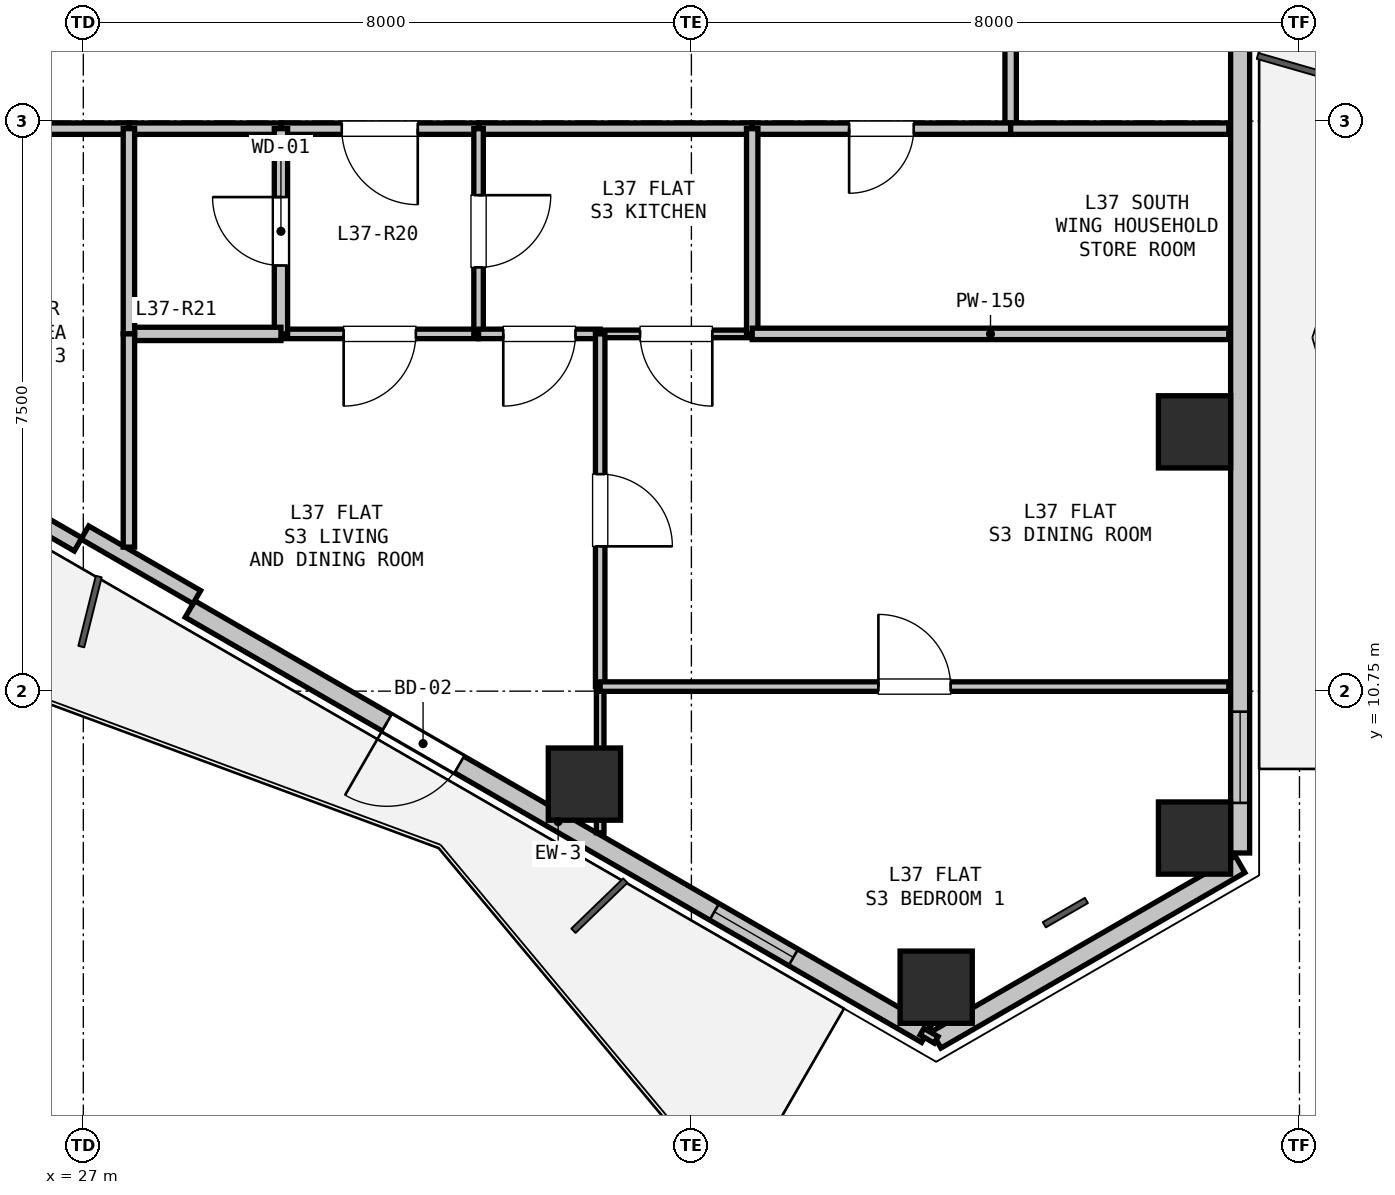
"""IFC4 building model, lengths in metres.
Left out: names, types, materials, properties, quantities, classifications, styles, units other than length and angle.
Written with IfcOpenShell. Run it as: python <this file> out.ifc"""

import sys

from ifc_helpers import new_model, si_unit, direction, frame, frame_2d, origin, origin_2d, place, context, subcontext, project, spatial, rectangle, hollow_rectangle, extrude, element, fill, save


model = new_model("IFC4")
c1 = context("Model", 3, precision=1e-05, world=origin(), true_north=direction((0.0, 1.0)))
c2 = subcontext(c1, "Body", "Model", "MODEL_VIEW")
j1 = project(units=[si_unit("LENGTHUNIT", "METRE"), si_unit("PLANEANGLEUNIT", "RADIAN")], contexts=[c1])
p1 = place(None, origin())
s1 = spatial("IfcSite", under=j1, at=p1, CompositionType="ELEMENT")
p2 = place(p1, origin())
s2 = spatial("IfcBuilding", under=s1, at=p2, CompositionType="ELEMENT")
p3 = place(p2, frame((0.0, 0.0, 134.4)))
s3 = spatial("IfcBuildingStorey", under=s2, at=p3, CompositionType="ELEMENT", Elevation=134.4)
for number, where, z_axis, x_axis in (
    (1, (41.619, 14.161, 0.0), (0.0, 0.0, 1.0), (1.0, 0.0, 0.0)),
    (2, (41.619, 8.817, 0.0), (0.0, 0.0, 1.0), (1.0, 0.0, 0.0)),
    (3, (38.22, 6.855, 0.0), (0.0, 0.0, 1.0), (1.0, 0.0, 0.0)),
    (4, (33.593, 9.527, 0.0), (0.0, 0.0, 1.0), (1.0, 0.0, 0.0)),
):
    element("IfcColumn", number, at=place(p3, frame(where, z_axis=z_axis, x_axis=x_axis)), inside=s3, PredefinedType="COLUMN", context=c2, shape_type="SweptSolid", body=[
        extrude(hollow_rectangle(XDim=0.95, YDim=0.95, WallThickness=0.028, at=origin_2d()), origin(), (0.0, 0.0, 1.0), 3.3),
    ])
p4 = place(p3, frame((42.219, 8.471, 0.0), z_axis=(0.0, 0.0, 1.0), x_axis=(-0.866035021055, -0.499983342029, 0.0)))
e5 = element("IfcWall", 5, at=p4, inside=s3, PredefinedType="SOLIDWALL", context=c2, shape_type="SweptSolid", body=[
    extrude(rectangle(XDim=4.617, YDim=0.25, at=frame_2d((2.309, 0.0))), origin(), (0.0, 0.0, 1.0), 2.68),
])
p5 = place(p3, frame((42.219, 19.807, 0.0), z_axis=(0.0, 0.0, 1.0), x_axis=(0.0, -1.0, 0.0)))
e6 = element("IfcWall", 6, at=p5, inside=s3, PredefinedType="SOLIDWALL", context=c2, shape_type="SweptSolid", body=[
    extrude(rectangle(XDim=11.186, YDim=0.25, at=frame_2d((5.593, 0.0))), origin(), (0.0, 0.0, 1.0), 2.68),
])
p6 = place(p5, frame((9.327, 0.0, 0.9)))
e7 = element("IfcOpeningElement", 7, at=p6, cuts=e6, PredefinedType="OPENING", context=c2, shape_type="SweptSolid", body=[
    extrude(rectangle(XDim=1.2, YDim=1.4, at=frame_2d((0.6, 0.7))), frame((0.0, 0.135, 0.0), z_axis=(0.0, -1.0, 0.0), x_axis=(1.0, 0.0, 0.0)), (0.0, 0.0, 1.0), 0.27),
])
p7 = place(p3, frame((38.091, 6.237, 0.0), z_axis=(0.0, 0.0, 1.0), x_axis=(-0.86602239209, 0.500005216371, 0.0)))
e8 = element("IfcWall", 8, at=p7, inside=s3, PredefinedType="SOLIDWALL", context=c2, shape_type="SweptSolid", body=[
    extrude(rectangle(XDim=11.186, YDim=0.25, at=frame_2d((5.593, 0.0))), origin(), (0.0, 0.0, 1.0), 2.68),
])
p8 = place(p7, frame((7.095, 0.0, 0.0)))
e9 = element("IfcOpeningElement", 9, at=p8, cuts=e8, PredefinedType="OPENING", context=c2, shape_type="SweptSolid", body=[
    extrude(rectangle(XDim=1.1, YDim=2.1, at=frame_2d((0.55, 1.05))), frame((0.0, 0.135, 0.0), z_axis=(0.0, -1.0, 0.0), x_axis=(1.0, 0.0, 0.0)), (0.0, 0.0, 1.0), 0.27),
])
p9 = place(p7, frame((2.02, 0.0, 0.9)))
e10 = element("IfcOpeningElement", 10, at=p9, cuts=e8, PredefinedType="OPENING", context=c2, shape_type="SweptSolid", body=[
    extrude(rectangle(XDim=1.2, YDim=1.4, at=frame_2d((0.6, 0.7))), frame((0.0, 0.135, 0.0), z_axis=(0.0, -1.0, 0.0), x_axis=(1.0, 0.0, 0.0)), (0.0, 0.0, 1.0), 0.27),
])
p10 = place(p3, frame((26.931, 12.68, 0.0), z_axis=(0.0, 0.0, 1.0), x_axis=(-0.866026619769, 0.499997893847, 0.0)))
e11 = element("IfcWall", 11, at=p10, inside=s3, PredefinedType="PARAPET", context=c2, shape_type="SweptSolid", body=[
    extrude(rectangle(XDim=10.486, YDim=0.2, at=frame_2d((5.243, 0.0))), origin(), (0.0, 0.0, 1.0), 0.2),
])
p11 = place(p3, frame((28.493, 11.986, 0.0), z_axis=(0.0, 0.0, 1.0), x_axis=(-0.86605165483, 0.499954529098, 0.0)))
e12 = element("IfcWall", 12, at=p11, inside=s3, PredefinedType="PARAPET", context=c2, shape_type="SweptSolid", body=[
    extrude(rectangle(XDim=1.7, YDim=0.2, at=frame_2d((0.85, 0.0))), origin(), (0.0, 0.0, 1.0), 2.68),
])
p12 = place(p3, frame((39.2, 19.9, 0.0), z_axis=(0.0, 0.0, 1.0), x_axis=(0.0, -1.0, 0.0)))
e13 = element("IfcWall", 13, at=p12, inside=s3, PredefinedType="PARTITIONING", context=c2, shape_type="SweptSolid", body=[
    extrude(rectangle(XDim=1.75, YDim=0.15, at=frame_2d((0.875, 0.0))), origin(), (0.0, 0.0, 1.0), 3.06),
])
p13 = place(p3, frame((39.2, 18.15, 0.0), z_axis=(0.0, 0.0, 1.0), x_axis=(-1.0, 0.0, 0.0)))
e14 = element("IfcWall", 14, at=p13, inside=s3, PredefinedType="PARTITIONING", context=c2, shape_type="SweptSolid", body=[
    extrude(rectangle(XDim=3.4, YDim=0.15, at=frame_2d((1.7, 0.0))), origin(), (0.0, 0.0, 1.0), 2.433),
])
p14 = place(p13, frame((1.275, 0.0, 0.0)))
e15 = element("IfcOpeningElement", 15, at=p14, cuts=e14, PredefinedType="OPENING", context=c2, shape_type="SweptSolid", body=[
    extrude(rectangle(XDim=0.85, YDim=2.1, at=frame_2d((0.425, 1.05))), frame((0.0, 0.085, 0.0), z_axis=(0.0, -1.0, 0.0), x_axis=(1.0, 0.0, 0.0)), (0.0, 0.0, 1.0), 0.17),
])
p15 = place(p3, frame((35.8, 18.15, 0.0), z_axis=(0.0, 0.0, 1.0), x_axis=(-1.0, 0.0, 0.0)))
e16 = element("IfcWall", 16, at=p15, inside=s3, PredefinedType="PARTITIONING", context=c2, shape_type="SweptSolid", body=[
    extrude(rectangle(XDim=3.6, YDim=0.15, at=frame_2d((1.8, 0.0))), origin(), (0.0, 0.0, 1.0), 3.06),
])
p16 = place(p3, frame((32.2, 18.15, 0.0), z_axis=(0.0, 0.0, 1.0), x_axis=(-1.0, 0.0, 0.0)))
e17 = element("IfcWall", 17, at=p16, inside=s3, PredefinedType="PARTITIONING", context=c2, shape_type="SweptSolid", body=[
    extrude(rectangle(XDim=2.6, YDim=0.15, at=frame_2d((1.3, 0.0))), origin(), (0.0, 0.0, 1.0), 3.06),
])
p17 = place(p16, frame((0.8, 0.0, 0.0)))
e18 = element("IfcOpeningElement", 18, at=p17, cuts=e17, PredefinedType="OPENING", context=c2, shape_type="SweptSolid", body=[
    extrude(rectangle(XDim=1.0, YDim=2.15, at=frame_2d((0.5, 1.075))), frame((0.0, 0.085, 0.0), z_axis=(0.0, -1.0, 0.0), x_axis=(1.0, 0.0, 0.0)), (0.0, 0.0, 1.0), 0.17),
])
p18 = place(p3, frame((29.6, 18.15, 0.0), z_axis=(0.0, 0.0, 1.0), x_axis=(-1.0, 0.0, 0.0)))
e19 = element("IfcWall", 19, at=p18, inside=s3, PredefinedType="PARTITIONING", context=c2, shape_type="SweptSolid", body=[
    extrude(rectangle(XDim=2.0, YDim=0.15, at=frame_2d((1.0, 0.0))), origin(), (0.0, 0.0, 1.0), 3.06),
])
p19 = place(p3, frame((27.6, 18.15, 0.0), z_axis=(0.0, 0.0, 1.0), x_axis=(-1.0, 0.0, 0.0)))
e20 = element("IfcWall", 20, at=p19, inside=s3, PredefinedType="PARTITIONING", context=c2, shape_type="SweptSolid", body=[
    extrude(rectangle(XDim=3.2, YDim=0.15, at=frame_2d((1.6, 0.0))), origin(), (0.0, 0.0, 1.0), 2.433),
])
p20 = place(p19, frame((1.1, 0.0, 0.0)))
e21 = element("IfcOpeningElement", 21, at=p20, cuts=e20, PredefinedType="OPENING", context=c2, shape_type="SweptSolid", body=[
    extrude(rectangle(XDim=1.0, YDim=2.15, at=frame_2d((0.5, 1.075))), frame((0.0, 0.085, 0.0), z_axis=(0.0, -1.0, 0.0), x_axis=(1.0, 0.0, 0.0)), (0.0, 0.0, 1.0), 0.17),
])
p21 = place(p3, frame((32.2, 15.45, 0.0), z_axis=(0.0, 0.0, 1.0), x_axis=(-1.0, 0.0, 0.0)))
e22 = element("IfcWall", 22, at=p21, inside=s3, PredefinedType="PARTITIONING", context=c2, shape_type="SweptSolid", body=[
    extrude(rectangle(XDim=2.6, YDim=0.125, at=frame_2d((1.3, 0.0))), origin(), (0.0, 0.0, 1.0), 3.06),
])
p22 = place(p21, frame((0.825, 0.0, 0.0)))
e23 = element("IfcOpeningElement", 23, at=p22, cuts=e22, PredefinedType="OPENING", context=c2, shape_type="SweptSolid", body=[
    extrude(rectangle(XDim=0.95, YDim=2.1, at=frame_2d((0.475, 1.05))), frame((0.0, 0.073, 0.0), z_axis=(0.0, -1.0, 0.0), x_axis=(1.0, 0.0, 0.0)), (0.0, 0.0, 1.0), 0.145),
])
p23 = place(p3, frame((29.6, 15.45, 0.0), z_axis=(0.0, 0.0, 1.0), x_axis=(0.0, 1.0, 0.0)))
e24 = element("IfcWall", 24, at=p23, inside=s3, PredefinedType="PLUMBINGWALL", context=c2, shape_type="SweptSolid", body=[
    extrude(rectangle(XDim=2.7, YDim=0.175, at=frame_2d((1.35, 0.0))), origin(), (0.0, 0.0, 1.0), 3.06),
])
p24 = place(p23, frame((0.9, 0.0, 0.0)))
e25 = element("IfcOpeningElement", 25, at=p24, cuts=e24, PredefinedType="OPENING", context=c2, shape_type="SweptSolid", body=[
    extrude(rectangle(XDim=0.9, YDim=2.1, at=frame_2d((0.45, 1.05))), frame((0.0, 0.097, 0.0), z_axis=(0.0, -1.0, 0.0), x_axis=(1.0, 0.0, 0.0)), (0.0, 0.0, 1.0), 0.195),
])
p25 = place(p3, frame((32.2, 18.15, 0.0), z_axis=(0.0, 0.0, 1.0), x_axis=(0.0, -1.0, 0.0)))
e26 = element("IfcWall", 26, at=p25, inside=s3, PredefinedType="PARTITIONING", context=c2, shape_type="SweptSolid", body=[
    extrude(rectangle(XDim=2.7, YDim=0.125, at=frame_2d((1.35, 0.0))), origin(), (0.0, 0.0, 1.0), 3.06),
])
p26 = place(p25, frame((0.875, 0.0, 0.0)))
e27 = element("IfcOpeningElement", 27, at=p26, cuts=e26, PredefinedType="OPENING", context=c2, shape_type="SweptSolid", body=[
    extrude(rectangle(XDim=0.95, YDim=2.1, at=frame_2d((0.475, 1.05))), frame((0.0, 0.073, 0.0), z_axis=(0.0, -1.0, 0.0), x_axis=(1.0, 0.0, 0.0)), (0.0, 0.0, 1.0), 0.145),
])
p27 = place(p3, frame((29.6, 15.45, 0.0), z_axis=(0.0, 0.0, 1.0), x_axis=(-1.0, 0.0, 0.0)))
e28 = element("IfcWall", 28, at=p27, inside=s3, PredefinedType="PLUMBINGWALL", context=c2, shape_type="SweptSolid", body=[
    extrude(rectangle(XDim=2.0, YDim=0.175, at=frame_2d((1.0, 0.0))), origin(), (0.0, 0.0, 1.0), 3.06),
])
p28 = place(p3, frame((27.6, 15.45, 0.0), z_axis=(0.0, 0.0, 1.0), x_axis=(0.0, 1.0, 0.0)))
e29 = element("IfcWall", 29, at=p28, inside=s3, PredefinedType="PARTITIONING", context=c2, shape_type="SweptSolid", body=[
    extrude(rectangle(XDim=2.7, YDim=0.15, at=frame_2d((1.35, 0.0))), origin(), (0.0, 0.0, 1.0), 3.06),
])
p29 = place(p3, frame((35.8, 15.45, 0.0), z_axis=(0.0, 0.0, 1.0), x_axis=(-1.0, 0.0, 0.0)))
e30 = element("IfcWall", 30, at=p29, inside=s3, PredefinedType="PARTITIONING", context=c2, shape_type="SweptSolid", body=[
    extrude(rectangle(XDim=2.0, YDim=0.1, at=frame_2d((1.0, 0.0))), origin(), (0.0, 0.0, 1.0), 3.06),
])
p30 = place(p29, frame((0.525, 0.0, 0.0)))
e31 = element("IfcOpeningElement", 31, at=p30, cuts=e30, PredefinedType="OPENING", context=c2, shape_type="SweptSolid", body=[
    extrude(rectangle(XDim=0.95, YDim=2.1, at=frame_2d((0.475, 1.05))), frame((0.0, 0.06, 0.0), z_axis=(0.0, -1.0, 0.0), x_axis=(1.0, 0.0, 0.0)), (0.0, 0.0, 1.0), 0.12),
])
p31 = place(p3, frame((33.8, 15.45, 0.0), z_axis=(0.0, 0.0, 1.0), x_axis=(-1.0, 0.0, 0.0)))
e32 = element("IfcWall", 32, at=p31, inside=s3, PredefinedType="PARTITIONING", context=c2, shape_type="SweptSolid", body=[
    extrude(rectangle(XDim=1.6, YDim=0.125, at=frame_2d((0.8, 0.0))), origin(), (0.0, 0.0, 1.0), 3.06),
])
p32 = place(p31, frame((0.325, 0.0, 0.0)))
e33 = element("IfcOpeningElement", 33, at=p32, cuts=e32, PredefinedType="OPENING", context=c2, shape_type="SweptSolid", body=[
    extrude(rectangle(XDim=0.95, YDim=2.1, at=frame_2d((0.475, 1.05))), frame((0.0, 0.073, 0.0), z_axis=(0.0, -1.0, 0.0), x_axis=(1.0, 0.0, 0.0)), (0.0, 0.0, 1.0), 0.145),
])
p33 = place(p3, frame((35.8, 18.15, 0.0), z_axis=(0.0, 0.0, 1.0), x_axis=(0.0, -1.0, 0.0)))
e34 = element("IfcWall", 34, at=p33, inside=s3, PredefinedType="PARTITIONING", context=c2, shape_type="SweptSolid", body=[
    extrude(rectangle(XDim=2.7, YDim=0.15, at=frame_2d((1.35, 0.0))), origin(), (0.0, 0.0, 1.0), 3.06),
])
p34 = place(p3, frame((39.2, 18.15, 0.0), z_axis=(0.0, 0.0, 1.0), x_axis=(1.0, 0.0, 0.0)))
e35 = element("IfcWall", 35, at=p34, inside=s3, PredefinedType="PARTITIONING", context=c2, shape_type="SweptSolid", body=[
    extrude(rectangle(XDim=2.87, YDim=0.15, at=frame_2d((1.435, 0.0))), origin(), (0.0, 0.0, 1.0), 2.365),
])
p35 = place(p3, frame((42.07, 15.45, 0.0), z_axis=(0.0, 0.0, 1.0), x_axis=(-1.0, 0.0, 0.0)))
e36 = element("IfcWall", 36, at=p35, inside=s3, PredefinedType="PARTITIONING", context=c2, shape_type="SweptSolid", body=[
    extrude(rectangle(XDim=6.27, YDim=0.15, at=frame_2d((3.135, 0.0))), origin(), (0.0, 0.0, 1.0), 2.365),
])
p36 = place(p3, frame((27.6, 15.45, 0.0), z_axis=(0.0, 0.0, 1.0), x_axis=(0.0, -1.0, 0.0)))
e37 = element("IfcWall", 37, at=p36, inside=s3, PredefinedType="PARTITIONING", context=c2, shape_type="SweptSolid", body=[
    extrude(rectangle(XDim=2.805, YDim=0.15, at=frame_2d((1.402, 0.0))), origin(), (0.0, 0.0, 1.0), 2.365),
])
p37 = place(p3, frame((33.8, 15.45, 0.0), z_axis=(0.0, 0.0, 1.0), x_axis=(0.0, -1.0, 0.0)))
e38 = element("IfcWall", 38, at=p37, inside=s3, PredefinedType="PARTITIONING", context=c2, shape_type="SweptSolid", body=[
    extrude(rectangle(XDim=4.64, YDim=0.125, at=frame_2d((2.32, 0.0))), origin(), (0.0, 0.0, 1.0), 3.06),
])
p38 = place(p37, frame((1.845, 0.0, 0.0)))
e39 = element("IfcOpeningElement", 39, at=p38, cuts=e38, PredefinedType="OPENING", context=c2, shape_type="SweptSolid", body=[
    extrude(rectangle(XDim=0.95, YDim=2.1, at=frame_2d((0.475, 1.05))), frame((0.0, 0.073, 0.0), z_axis=(0.0, -1.0, 0.0), x_axis=(1.0, 0.0, 0.0)), (0.0, 0.0, 1.0), 0.145),
])
p39 = place(p3, frame((33.8, 10.81, 0.0), z_axis=(0.0, 0.0, 1.0), x_axis=(0.0, -1.0, 0.0)))
e40 = element("IfcWall", 40, at=p39, inside=s3, PredefinedType="PARTITIONING", context=c2, shape_type="SweptSolid", body=[
    extrude(rectangle(XDim=1.923, YDim=0.1, at=frame_2d((0.962, 0.0))), origin(), (0.0, 0.0, 1.0), 3.06),
])
p40 = place(p3, frame((33.8, 10.81, 0.0), z_axis=(0.0, 0.0, 1.0), x_axis=(1.0, 0.0, 0.0)))
e41 = element("IfcWall", 41, at=p40, inside=s3, PredefinedType="PARTITIONING", context=c2, shape_type="SweptSolid", body=[
    extrude(rectangle(XDim=8.27, YDim=0.125, at=frame_2d((4.135, 0.0))), origin(), (0.0, 0.0, 1.0), 2.433),
])
p41 = place(p40, frame((3.66, 0.0, 0.0)))
e42 = element("IfcOpeningElement", 42, at=p41, cuts=e41, PredefinedType="OPENING", context=c2, shape_type="SweptSolid", body=[
    extrude(rectangle(XDim=0.95, YDim=2.1, at=frame_2d((0.475, 1.05))), frame((0.0, 0.073, 0.0), z_axis=(0.0, -1.0, 0.0), x_axis=(1.0, 0.0, 0.0)), (0.0, 0.0, 1.0), 0.145),
])
p42 = place(p3, frame((38.221, 6.162, 0.0), z_axis=(0.0, 0.0, 1.0), x_axis=(-0.865581379588, 0.500768285049, 0.0)))
e43 = element("IfcWall", 43, at=p42, inside=s3, PredefinedType="PARTITIONING", context=c2, shape_type="SweptSolid", body=[
    extrude(rectangle(XDim=0.216, YDim=0.1, at=frame_2d((0.108, 0.0))), origin(), (0.0, 0.0, 1.0), 3.06),
])
p43 = place(p6, origin())
e44 = element("IfcWindow", 44, at=p43, inside=s3, PartitioningType="SINGLE_PANEL", PredefinedType="WINDOW", context=c2, shape_type="SweptSolid", body=[
    extrude(rectangle(XDim=1.2, YDim=1.4, at=frame_2d((0.6, 0.7))), frame((0.0, 0.03, 0.0), z_axis=(0.0, -1.0, 0.0), x_axis=(1.0, 0.0, 0.0)), (0.0, 0.0, 1.0), 0.06),
])
fill(e7, e44)
p44 = place(p8, origin())
e45 = element("IfcDoor", 45, at=p44, inside=s3, OperationType="SINGLE_SWING_RIGHT", PredefinedType="DOOR", context=c2, shape_type="SweptSolid", body=[
    extrude(rectangle(XDim=1.1, YDim=2.1, at=frame_2d((0.55, 1.05))), frame((0.0, 0.025, 0.0), z_axis=(0.0, -1.0, 0.0), x_axis=(1.0, 0.0, 0.0)), (0.0, 0.0, 1.0), 0.05),
])
fill(e9, e45)
p45 = place(p9, origin())
e46 = element("IfcWindow", 46, at=p45, inside=s3, PartitioningType="SINGLE_PANEL", PredefinedType="WINDOW", context=c2, shape_type="SweptSolid", body=[
    extrude(rectangle(XDim=1.2, YDim=1.4, at=frame_2d((0.6, 0.7))), frame((0.0, 0.03, 0.0), z_axis=(0.0, -1.0, 0.0), x_axis=(1.0, 0.0, 0.0)), (0.0, 0.0, 1.0), 0.06),
])
fill(e10, e46)
p46 = place(p17, origin())
e47 = element("IfcDoor", 47, at=p46, inside=s3, OperationType="SINGLE_SWING_LEFT", PredefinedType="DOOR", context=c2, shape_type="SweptSolid", body=[
    extrude(rectangle(XDim=1.0, YDim=2.15, at=frame_2d((0.5, 1.075))), frame((0.0, 0.025, 0.0), z_axis=(0.0, -1.0, 0.0), x_axis=(1.0, 0.0, 0.0)), (0.0, 0.0, 1.0), 0.05),
])
fill(e18, e47)
p47 = place(p14, origin())
e48 = element("IfcDoor", 48, at=p47, inside=s3, OperationType="SINGLE_SWING_RIGHT", PredefinedType="DOOR", context=c2, shape_type="SweptSolid", body=[
    extrude(rectangle(XDim=0.85, YDim=2.1, at=frame_2d((0.425, 1.05))), frame((0.0, 0.025, 0.0), z_axis=(0.0, -1.0, 0.0), x_axis=(1.0, 0.0, 0.0)), (0.0, 0.0, 1.0), 0.05),
])
fill(e15, e48)
p48 = place(p24, origin())
e49 = element("IfcDoor", 49, at=p48, inside=s3, OperationType="SINGLE_SWING_RIGHT", PredefinedType="DOOR", context=c2, shape_type="SweptSolid", body=[
    extrude(rectangle(XDim=0.9, YDim=2.1, at=frame_2d((0.45, 1.05))), frame((0.0, 0.025, 0.0), z_axis=(0.0, -1.0, 0.0), x_axis=(1.0, 0.0, 0.0)), (0.0, 0.0, 1.0), 0.05),
])
fill(e25, e49)
p49 = place(p26, origin())
e50 = element("IfcDoor", 50, at=p49, inside=s3, OperationType="SINGLE_SWING_LEFT", PredefinedType="DOOR", context=c2, shape_type="SweptSolid", body=[
    extrude(rectangle(XDim=0.95, YDim=2.1, at=frame_2d((0.475, 1.05))), frame((0.0, 0.025, 0.0), z_axis=(0.0, -1.0, 0.0), x_axis=(1.0, 0.0, 0.0)), (0.0, 0.0, 1.0), 0.05),
])
fill(e27, e50)
p50 = place(p22, origin())
e51 = element("IfcDoor", 51, at=p50, inside=s3, OperationType="SINGLE_SWING_RIGHT", PredefinedType="DOOR", context=c2, shape_type="SweptSolid", body=[
    extrude(rectangle(XDim=0.95, YDim=2.1, at=frame_2d((0.475, 1.05))), frame((0.0, 0.025, 0.0), z_axis=(0.0, -1.0, 0.0), x_axis=(1.0, 0.0, 0.0)), (0.0, 0.0, 1.0), 0.05),
])
fill(e23, e51)
p51 = place(p32, origin())
e52 = element("IfcDoor", 52, at=p51, inside=s3, OperationType="SINGLE_SWING_RIGHT", PredefinedType="DOOR", context=c2, shape_type="SweptSolid", body=[
    extrude(rectangle(XDim=0.95, YDim=2.1, at=frame_2d((0.475, 1.05))), frame((0.0, 0.025, 0.0), z_axis=(0.0, -1.0, 0.0), x_axis=(1.0, 0.0, 0.0)), (0.0, 0.0, 1.0), 0.05),
])
fill(e33, e52)
p52 = place(p30, origin())
e53 = element("IfcDoor", 53, at=p52, inside=s3, OperationType="SINGLE_SWING_LEFT", PredefinedType="DOOR", context=c2, shape_type="SweptSolid", body=[
    extrude(rectangle(XDim=0.95, YDim=2.1, at=frame_2d((0.475, 1.05))), frame((0.0, 0.025, 0.0), z_axis=(0.0, -1.0, 0.0), x_axis=(1.0, 0.0, 0.0)), (0.0, 0.0, 1.0), 0.05),
])
fill(e31, e53)
p53 = place(p38, origin())
e54 = element("IfcDoor", 54, at=p53, inside=s3, OperationType="SINGLE_SWING_RIGHT", PredefinedType="DOOR", context=c2, shape_type="SweptSolid", body=[
    extrude(rectangle(XDim=0.95, YDim=2.1, at=frame_2d((0.475, 1.05))), frame((0.0, 0.025, 0.0), z_axis=(0.0, -1.0, 0.0), x_axis=(1.0, 0.0, 0.0)), (0.0, 0.0, 1.0), 0.05),
])
fill(e39, e54)
p54 = place(p41, origin())
e55 = element("IfcDoor", 55, at=p54, inside=s3, OperationType="SINGLE_SWING_LEFT", PredefinedType="DOOR", context=c2, shape_type="SweptSolid", body=[
    extrude(rectangle(XDim=0.95, YDim=2.1, at=frame_2d((0.475, 1.05))), frame((0.0, 0.025, 0.0), z_axis=(0.0, -1.0, 0.0), x_axis=(1.0, 0.0, 0.0)), (0.0, 0.0, 1.0), 0.05),
])
fill(e42, e55)
save(model, sys.argv[1])
